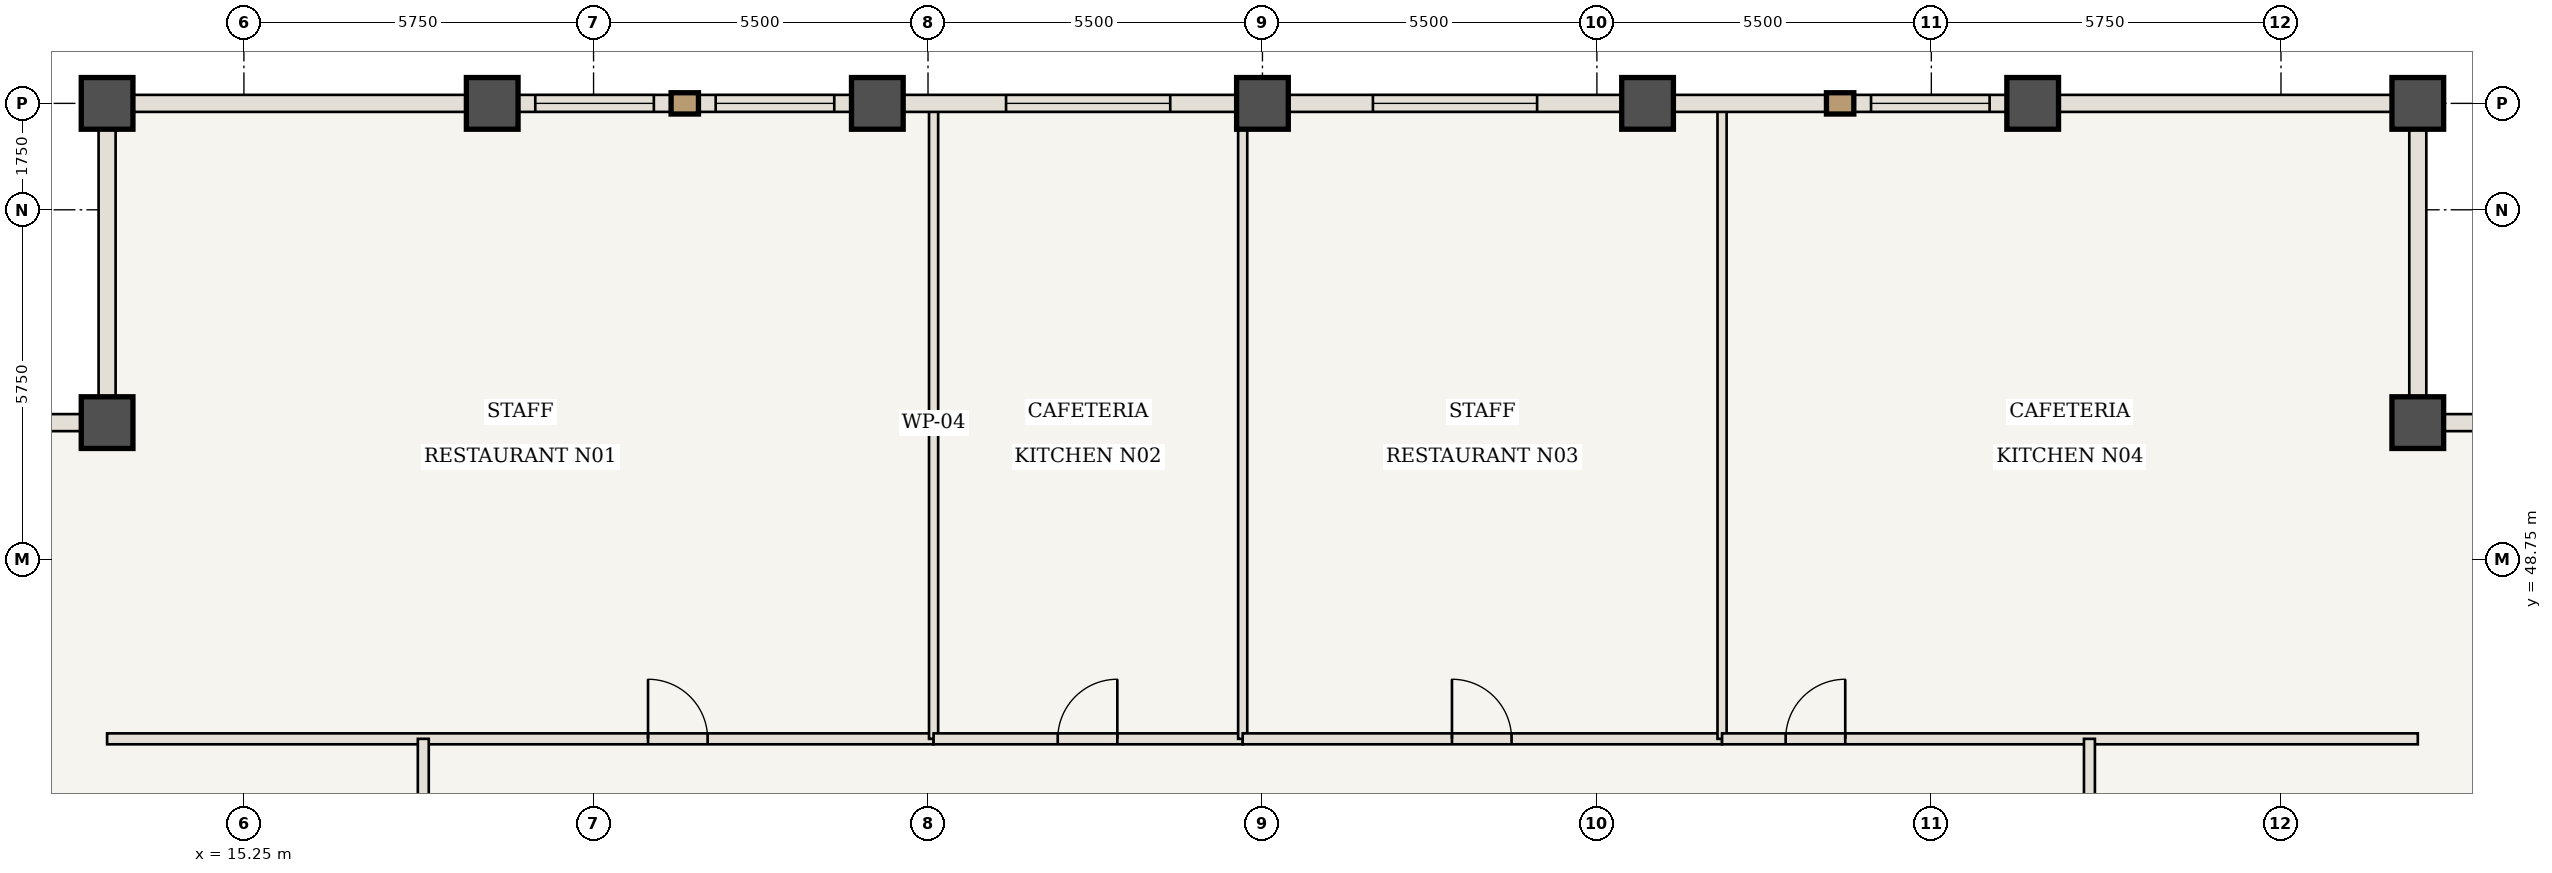
"""IFC4 building model, lengths in metres.
Left out: names, types, materials, properties, quantities, classifications, styles, units other than length and angle.
Written with IfcOpenShell. Run it as: python <this file> out.ifc"""

import sys

from ifc_helpers import new_model, si_unit, direction, frame, frame_2d, origin, origin_2d, place, context, subcontext, project, spatial, rectangle, extrude, element, fill, save


model = new_model("IFC4")
c1 = context("Model", 3, precision=1e-05, world=origin(), true_north=direction((0.0, 1.0)))
c2 = subcontext(c1, "Body", "Model", "MODEL_VIEW")
j1 = project(units=[si_unit("LENGTHUNIT", "METRE"), si_unit("PLANEANGLEUNIT", "RADIAN")], contexts=[c1])
p1 = place(None, origin())
s1 = spatial("IfcSite", under=j1, at=p1, CompositionType="ELEMENT")
p2 = place(p1, origin())
s2 = spatial("IfcBuilding", under=s1, at=p2, CompositionType="ELEMENT")
p3 = place(p2, frame((0.0, 0.0, 244.65)))
s3 = spatial("IfcBuildingStorey", under=s2, at=p3, CompositionType="ELEMENT", Elevation=244.65)
for number, where, z_axis, x_axis in (
    (1, (51.0, 51.0, 0.0), (0.0, 0.0, 1.0), (1.0, 0.0, 0.0)),
    (2, (51.0, 56.25, 0.0), (0.0, 0.0, 1.0), (1.0, 0.0, 0.0)),
    (3, (13.0, 56.25, 0.0), (0.0, 0.0, 1.0), (1.0, 0.0, 0.0)),
    (4, (13.0, 51.0, 0.0), (0.0, 0.0, 1.0), (1.0, 0.0, 0.0)),
    (5, (19.333, 56.25, 0.0), (0.0, 0.0, 1.0), (1.0, 0.0, 0.0)),
    (6, (25.667, 56.25, 0.0), (0.0, 0.0, 1.0), (1.0, 0.0, 0.0)),
    (7, (32.0, 56.25, 0.0), (0.0, 0.0, 1.0), (1.0, 0.0, 0.0)),
    (8, (38.333, 56.25, 0.0), (0.0, 0.0, 1.0), (1.0, 0.0, 0.0)),
    (9, (44.667, 56.25, 0.0), (0.0, 0.0, 1.0), (1.0, 0.0, 0.0)),
):
    element("IfcColumn", number, at=place(p3, frame(where, z_axis=z_axis, x_axis=x_axis)), inside=s3, PredefinedType="COLUMN", context=c2, shape_type="SweptSolid", body=[
        extrude(rectangle(XDim=0.85, YDim=0.85, at=origin_2d()), origin(), (0.0, 0.0, 1.0), 3.85),
    ])
p4 = place(p3, frame((13.0, 45.8, 0.0), z_axis=(0.0, 0.0, 1.0), x_axis=(1.0, 0.0, 0.0)))
e10 = element("IfcWall", 10, at=p4, inside=s3, PredefinedType="STANDARD", context=c2, shape_type="SweptSolid", body=[
    extrude(rectangle(XDim=13.592, YDim=0.18, at=frame_2d((6.796, 0.0))), origin(), (0.0, 0.0, 1.0), 3.685),
])
p5 = place(p4, frame((8.896, 0.0, 0.0)))
e11 = element("IfcOpeningElement", 11, at=p5, cuts=e10, PredefinedType="OPENING", context=c2, shape_type="SweptSolid", body=[
    extrude(rectangle(XDim=0.98, YDim=2.2, at=frame_2d((0.49, 1.1))), frame((0.0, 0.1, 0.0), z_axis=(0.0, -1.0, 0.0), x_axis=(1.0, 0.0, 0.0)), (0.0, 0.0, 1.0), 0.2),
])
p6 = place(p3, frame((26.592, 45.8, 0.0), z_axis=(0.0, 0.0, 1.0), x_axis=(0.0, 1.0, 0.0)))
e12 = element("IfcWall", 12, at=p6, inside=s3, PredefinedType="STANDARD", context=c2, shape_type="SweptSolid", body=[
    extrude(rectangle(XDim=10.39, YDim=0.15, at=frame_2d((5.195, 0.0))), origin(), (0.0, 0.0, 1.0), 3.685),
])
p7 = place(p3, frame((26.592, 45.8, 0.0), z_axis=(0.0, 0.0, 1.0), x_axis=(1.0, 0.0, 0.0)))
e13 = element("IfcWall", 13, at=p7, inside=s3, PredefinedType="STANDARD", context=c2, shape_type="SweptSolid", body=[
    extrude(rectangle(XDim=5.083, YDim=0.18, at=frame_2d((2.542, 0.0))), origin(), (0.0, 0.0, 1.0), 3.685),
])
p8 = place(p7, frame((2.042, 0.0, 0.0)))
e14 = element("IfcOpeningElement", 14, at=p8, cuts=e13, PredefinedType="OPENING", context=c2, shape_type="SweptSolid", body=[
    extrude(rectangle(XDim=0.98, YDim=2.2, at=frame_2d((0.49, 1.1))), frame((0.0, 0.1, 0.0), z_axis=(0.0, -1.0, 0.0), x_axis=(1.0, 0.0, 0.0)), (0.0, 0.0, 1.0), 0.2),
])
p9 = place(p3, frame((31.675, 45.8, 0.0), z_axis=(0.0, 0.0, 1.0), x_axis=(0.0, 1.0, 0.0)))
e15 = element("IfcWall", 15, at=p9, inside=s3, PredefinedType="STANDARD", context=c2, shape_type="SweptSolid", body=[
    extrude(rectangle(XDim=10.39, YDim=0.15, at=frame_2d((5.195, 0.0))), origin(), (0.0, 0.0, 1.0), 3.685),
])
p10 = place(p3, frame((31.675, 45.8, 0.0), z_axis=(0.0, 0.0, 1.0), x_axis=(1.0, 0.0, 0.0)))
e16 = element("IfcWall", 16, at=p10, inside=s3, PredefinedType="STANDARD", context=c2, shape_type="SweptSolid", body=[
    extrude(rectangle(XDim=7.883, YDim=0.18, at=frame_2d((3.942, 0.0))), origin(), (0.0, 0.0, 1.0), 3.685),
])
p11 = place(p10, frame((3.442, 0.0, 0.0)))
e17 = element("IfcOpeningElement", 17, at=p11, cuts=e16, PredefinedType="OPENING", context=c2, shape_type="SweptSolid", body=[
    extrude(rectangle(XDim=0.98, YDim=2.2, at=frame_2d((0.49, 1.1))), frame((0.0, 0.1, 0.0), z_axis=(0.0, -1.0, 0.0), x_axis=(1.0, 0.0, 0.0)), (0.0, 0.0, 1.0), 0.2),
])
p12 = place(p3, frame((39.558, 45.8, 0.0), z_axis=(0.0, 0.0, 1.0), x_axis=(0.0, 1.0, 0.0)))
e18 = element("IfcWall", 18, at=p12, inside=s3, PredefinedType="STANDARD", context=c2, shape_type="SweptSolid", body=[
    extrude(rectangle(XDim=10.39, YDim=0.15, at=frame_2d((5.195, 0.0))), origin(), (0.0, 0.0, 1.0), 3.685),
])
p13 = place(p3, frame((39.558, 45.8, 0.0), z_axis=(0.0, 0.0, 1.0), x_axis=(1.0, 0.0, 0.0)))
e19 = element("IfcWall", 19, at=p13, inside=s3, PredefinedType="STANDARD", context=c2, shape_type="SweptSolid", body=[
    extrude(rectangle(XDim=11.442, YDim=0.18, at=frame_2d((5.721, 0.0))), origin(), (0.0, 0.0, 1.0), 3.685),
])
p14 = place(p13, frame((1.046, 0.0, 0.0)))
e20 = element("IfcOpeningElement", 20, at=p14, cuts=e19, PredefinedType="OPENING", context=c2, shape_type="SweptSolid", body=[
    extrude(rectangle(XDim=0.98, YDim=2.2, at=frame_2d((0.49, 1.1))), frame((0.0, 0.1, 0.0), z_axis=(0.0, -1.0, 0.0), x_axis=(1.0, 0.0, 0.0)), (0.0, 0.0, 1.0), 0.2),
])
p15 = place(p3, frame((18.2, 18.2, 0.0), z_axis=(0.0, 0.0, 1.0), x_axis=(0.0, 1.0, 0.0)))
e21 = element("IfcWall", 21, at=p15, inside=s3, PredefinedType="STANDARD", context=c2, shape_type="SweptSolid", body=[
    extrude(rectangle(XDim=27.6, YDim=0.18, at=frame_2d((13.8, 0.0))), origin(), (0.0, 0.0, 1.0), 3.685),
])
p16 = place(p15, frame((14.75, 0.0, 0.0)))
e22 = element("IfcOpeningElement", 22, at=p16, cuts=e21, PredefinedType="OPENING", context=c2, shape_type="SweptSolid", body=[
    extrude(rectangle(XDim=0.98, YDim=2.2, at=frame_2d((0.49, 1.1))), frame((0.0, 0.1, 0.0), z_axis=(0.0, -1.0, 0.0), x_axis=(1.0, 0.0, 0.0)), (0.0, 0.0, 1.0), 0.2),
])
p17 = place(p3, frame((45.6, 30.75, 0.0), z_axis=(0.0, 0.0, 1.0), x_axis=(0.0, 1.0, 0.0)))
e23 = element("IfcWall", 23, at=p17, inside=s3, PredefinedType="STANDARD", context=c2, shape_type="SweptSolid", body=[
    extrude(rectangle(XDim=15.05, YDim=0.18, at=frame_2d((7.525, 0.0))), origin(), (0.0, 0.0, 1.0), 3.685),
])
p18 = place(p17, frame((7.025, 0.0, 0.0)))
e24 = element("IfcOpeningElement", 24, at=p18, cuts=e23, PredefinedType="OPENING", context=c2, shape_type="SweptSolid", body=[
    extrude(rectangle(XDim=0.98, YDim=2.2, at=frame_2d((0.49, 1.1))), frame((0.0, 0.1, 0.0), z_axis=(0.0, -1.0, 0.0), x_axis=(1.0, 0.0, 0.0)), (0.0, 0.0, 1.0), 0.2),
])
p19 = place(p3, frame((13.0, 56.25, 0.0), z_axis=(0.0, 0.0, 1.0), x_axis=(1.0, 0.0, 0.0)))
e25 = element("IfcWall", 25, at=p19, inside=s3, PredefinedType="USERDEFINED", context=c2, shape_type="SweptSolid", body=[
    extrude(rectangle(XDim=6.333, YDim=0.28, at=frame_2d((3.167, 0.0))), origin(), (0.0, 0.0, 1.0), 2.985),
])
p20 = place(p3, frame((19.333, 56.25, 0.0), z_axis=(0.0, 0.0, 1.0), x_axis=(1.0, 0.0, 0.0)))
e26 = element("IfcWall", 26, at=p20, inside=s3, PredefinedType="USERDEFINED", context=c2, shape_type="SweptSolid", body=[
    extrude(rectangle(XDim=6.333, YDim=0.28, at=frame_2d((3.167, 0.0))), origin(), (0.0, 0.0, 1.0), 2.985),
])
p21 = place(p20, frame((0.708, 0.0, 0.85)))
e27 = element("IfcOpeningElement", 27, at=p21, cuts=e26, PredefinedType="OPENING", context=c2, shape_type="SweptSolid", body=[
    extrude(rectangle(XDim=1.95, YDim=1.935, at=frame_2d((0.975, 0.968))), frame((0.0, 0.15, 0.0), z_axis=(0.0, -1.0, 0.0), x_axis=(1.0, 0.0, 0.0)), (0.0, 0.0, 1.0), 0.3),
])
p22 = place(p20, frame((3.675, 0.0, 0.85)))
e28 = element("IfcOpeningElement", 28, at=p22, cuts=e26, PredefinedType="OPENING", context=c2, shape_type="SweptSolid", body=[
    extrude(rectangle(XDim=1.95, YDim=1.935, at=frame_2d((0.975, 0.968))), frame((0.0, 0.15, 0.0), z_axis=(0.0, -1.0, 0.0), x_axis=(1.0, 0.0, 0.0)), (0.0, 0.0, 1.0), 0.3),
])
p23 = place(p3, frame((25.667, 56.25, 0.0), z_axis=(0.0, 0.0, 1.0), x_axis=(1.0, 0.0, 0.0)))
e29 = element("IfcWall", 29, at=p23, inside=s3, PredefinedType="USERDEFINED", context=c2, shape_type="SweptSolid", body=[
    extrude(rectangle(XDim=6.333, YDim=0.28, at=frame_2d((3.167, 0.0))), origin(), (0.0, 0.0, 1.0), 2.985),
])
p24 = place(p23, frame((2.117, 0.0, 0.85)))
e30 = element("IfcOpeningElement", 30, at=p24, cuts=e29, PredefinedType="OPENING", context=c2, shape_type="SweptSolid", body=[
    extrude(rectangle(XDim=2.7, YDim=1.935, at=frame_2d((1.35, 0.968))), frame((0.0, 0.15, 0.0), z_axis=(0.0, -1.0, 0.0), x_axis=(1.0, 0.0, 0.0)), (0.0, 0.0, 1.0), 0.3),
])
p25 = place(p3, frame((32.0, 56.25, 0.0), z_axis=(0.0, 0.0, 1.0), x_axis=(1.0, 0.0, 0.0)))
e31 = element("IfcWall", 31, at=p25, inside=s3, PredefinedType="USERDEFINED", context=c2, shape_type="SweptSolid", body=[
    extrude(rectangle(XDim=6.333, YDim=0.28, at=frame_2d((3.167, 0.0))), origin(), (0.0, 0.0, 1.0), 2.985),
])
p26 = place(p25, frame((1.817, 0.0, 0.85)))
e32 = element("IfcOpeningElement", 32, at=p26, cuts=e31, PredefinedType="OPENING", context=c2, shape_type="SweptSolid", body=[
    extrude(rectangle(XDim=2.7, YDim=1.935, at=frame_2d((1.35, 0.968))), frame((0.0, 0.15, 0.0), z_axis=(0.0, -1.0, 0.0), x_axis=(1.0, 0.0, 0.0)), (0.0, 0.0, 1.0), 0.3),
])
p27 = place(p3, frame((38.333, 56.25, 0.0), z_axis=(0.0, 0.0, 1.0), x_axis=(1.0, 0.0, 0.0)))
e33 = element("IfcWall", 33, at=p27, inside=s3, PredefinedType="USERDEFINED", context=c2, shape_type="SweptSolid", body=[
    extrude(rectangle(XDim=6.333, YDim=0.28, at=frame_2d((3.167, 0.0))), origin(), (0.0, 0.0, 1.0), 2.985),
])
p28 = place(p27, frame((3.675, 0.0, 0.85)))
e34 = element("IfcOpeningElement", 34, at=p28, cuts=e33, PredefinedType="OPENING", context=c2, shape_type="SweptSolid", body=[
    extrude(rectangle(XDim=1.95, YDim=1.935, at=frame_2d((0.975, 0.968))), frame((0.0, 0.15, 0.0), z_axis=(0.0, -1.0, 0.0), x_axis=(1.0, 0.0, 0.0)), (0.0, 0.0, 1.0), 0.3),
])
p29 = place(p3, frame((44.667, 56.25, 0.0), z_axis=(0.0, 0.0, 1.0), x_axis=(1.0, 0.0, 0.0)))
e35 = element("IfcWall", 35, at=p29, inside=s3, PredefinedType="USERDEFINED", context=c2, shape_type="SweptSolid", body=[
    extrude(rectangle(XDim=6.333, YDim=0.28, at=frame_2d((3.167, 0.0))), origin(), (0.0, 0.0, 1.0), 2.985),
])
for number, where, z_axis, x_axis in (
    (36, (51.0, 51.0, 0.0), (0.0, 0.0, 1.0), (1.0, 0.0, 0.0)),
    (37, (51.0, 56.25, 0.0), (0.0, 0.0, 1.0), (0.0, -1.0, 0.0)),
    (38, (13.0, 51.0, 0.0), (0.0, 0.0, 1.0), (0.0, 1.0, 0.0)),
    (39, (7.75, 51.0, 0.0), (0.0, 0.0, 1.0), (1.0, 0.0, 0.0)),
):
    element("IfcWall", number, at=place(p3, frame(where, z_axis=z_axis, x_axis=x_axis)), inside=s3, PredefinedType="USERDEFINED", context=c2, shape_type="SweptSolid", body=[
        extrude(rectangle(XDim=5.25, YDim=0.28, at=frame_2d((2.625, 0.0))), origin(), (0.0, 0.0, 1.0), 2.985),
    ])
p30 = place(p5, origin())
e40 = element("IfcDoor", 40, at=p30, inside=s3, OperationType="SINGLE_SWING_LEFT", PredefinedType="DOOR", context=c2, shape_type="SweptSolid", body=[
    extrude(rectangle(XDim=0.98, YDim=2.2, at=frame_2d((0.49, 1.1))), frame((0.0, 0.025, 0.0), z_axis=(0.0, -1.0, 0.0), x_axis=(1.0, 0.0, 0.0)), (0.0, 0.0, 1.0), 0.05),
])
fill(e11, e40)
p31 = place(p8, origin())
e41 = element("IfcDoor", 41, at=p31, inside=s3, OperationType="SINGLE_SWING_RIGHT", PredefinedType="DOOR", context=c2, shape_type="SweptSolid", body=[
    extrude(rectangle(XDim=0.98, YDim=2.2, at=frame_2d((0.49, 1.1))), frame((0.0, 0.025, 0.0), z_axis=(0.0, -1.0, 0.0), x_axis=(1.0, 0.0, 0.0)), (0.0, 0.0, 1.0), 0.05),
])
fill(e14, e41)
p32 = place(p11, origin())
e42 = element("IfcDoor", 42, at=p32, inside=s3, OperationType="SINGLE_SWING_LEFT", PredefinedType="DOOR", context=c2, shape_type="SweptSolid", body=[
    extrude(rectangle(XDim=0.98, YDim=2.2, at=frame_2d((0.49, 1.1))), frame((0.0, 0.025, 0.0), z_axis=(0.0, -1.0, 0.0), x_axis=(1.0, 0.0, 0.0)), (0.0, 0.0, 1.0), 0.05),
])
fill(e17, e42)
p33 = place(p14, origin())
e43 = element("IfcDoor", 43, at=p33, inside=s3, OperationType="SINGLE_SWING_RIGHT", PredefinedType="DOOR", context=c2, shape_type="SweptSolid", body=[
    extrude(rectangle(XDim=0.98, YDim=2.2, at=frame_2d((0.49, 1.1))), frame((0.0, 0.025, 0.0), z_axis=(0.0, -1.0, 0.0), x_axis=(1.0, 0.0, 0.0)), (0.0, 0.0, 1.0), 0.05),
])
fill(e20, e43)
p34 = place(p21, origin())
e44 = element("IfcWindow", 44, at=p34, inside=s3, PartitioningType="SINGLE_PANEL", PredefinedType="WINDOW", context=c2, shape_type="SweptSolid", body=[
    extrude(rectangle(XDim=1.95, YDim=1.935, at=frame_2d((0.975, 0.968))), frame((0.0, 0.03, 0.0), z_axis=(0.0, -1.0, 0.0), x_axis=(1.0, 0.0, 0.0)), (0.0, 0.0, 1.0), 0.06),
])
fill(e27, e44)
p35 = place(p22, origin())
e45 = element("IfcWindow", 45, at=p35, inside=s3, PartitioningType="SINGLE_PANEL", PredefinedType="WINDOW", context=c2, shape_type="SweptSolid", body=[
    extrude(rectangle(XDim=1.95, YDim=1.935, at=frame_2d((0.975, 0.968))), frame((0.0, 0.03, 0.0), z_axis=(0.0, -1.0, 0.0), x_axis=(1.0, 0.0, 0.0)), (0.0, 0.0, 1.0), 0.06),
])
fill(e28, e45)
p36 = place(p24, origin())
e46 = element("IfcWindow", 46, at=p36, inside=s3, PartitioningType="SINGLE_PANEL", PredefinedType="WINDOW", context=c2, shape_type="SweptSolid", body=[
    extrude(rectangle(XDim=2.7, YDim=1.935, at=frame_2d((1.35, 0.968))), frame((0.0, 0.03, 0.0), z_axis=(0.0, -1.0, 0.0), x_axis=(1.0, 0.0, 0.0)), (0.0, 0.0, 1.0), 0.06),
])
fill(e30, e46)
p37 = place(p26, origin())
e47 = element("IfcWindow", 47, at=p37, inside=s3, PartitioningType="SINGLE_PANEL", PredefinedType="WINDOW", context=c2, shape_type="SweptSolid", body=[
    extrude(rectangle(XDim=2.7, YDim=1.935, at=frame_2d((1.35, 0.968))), frame((0.0, 0.03, 0.0), z_axis=(0.0, -1.0, 0.0), x_axis=(1.0, 0.0, 0.0)), (0.0, 0.0, 1.0), 0.06),
])
fill(e32, e47)
p38 = place(p28, origin())
e48 = element("IfcWindow", 48, at=p38, inside=s3, PartitioningType="SINGLE_PANEL", PredefinedType="WINDOW", context=c2, shape_type="SweptSolid", body=[
    extrude(rectangle(XDim=1.95, YDim=1.935, at=frame_2d((0.975, 0.968))), frame((0.0, 0.03, 0.0), z_axis=(0.0, -1.0, 0.0), x_axis=(1.0, 0.0, 0.0)), (0.0, 0.0, 1.0), 0.06),
])
fill(e34, e48)
save(model, sys.argv[1])
